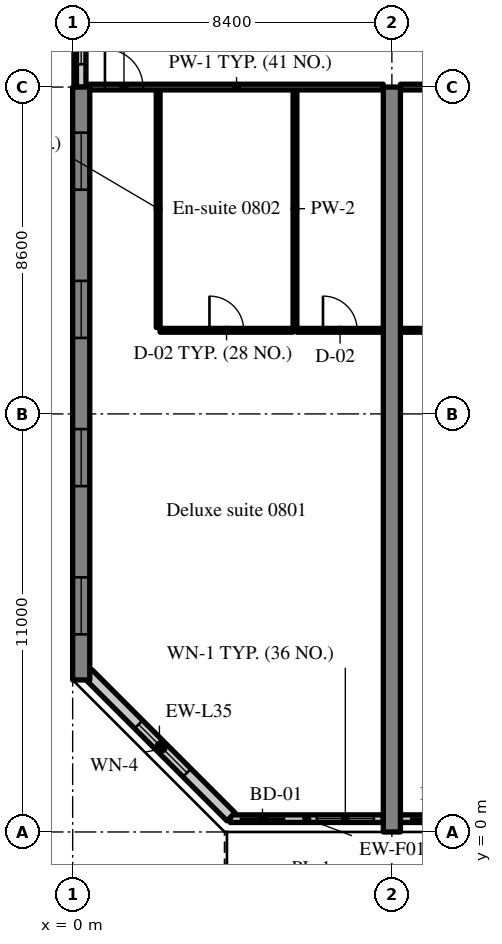
"""IFC4 building model, lengths in metres.
Left out: names, types, materials, properties, quantities, classifications, styles, units other than length and angle.
Written with IfcOpenShell. Run it as: python <this file> out.ifc"""

import sys

from ifc_helpers import new_model, si_unit, direction, frame, frame_2d, origin, place, context, subcontext, project, spatial, rectangle, extrude, source, transform, mapped, element, fill, save


model = new_model("IFC4")
c1 = context("Model", 3, precision=1e-05, world=origin(), true_north=direction((0.0, 1.0)))
c2 = subcontext(c1, "Body", "Model", "MODEL_VIEW")
j1 = project(units=[si_unit("LENGTHUNIT", "METRE"), si_unit("PLANEANGLEUNIT", "RADIAN")], contexts=[c1])
p1 = place(None, origin())
s1 = spatial("IfcSite", under=j1, at=p1, CompositionType="ELEMENT")
p2 = place(p1, origin())
s2 = spatial("IfcBuilding", under=s1, at=p2, CompositionType="ELEMENT")
p3 = place(p2, frame((0.0, 0.0, 39.2)))
s3 = spatial("IfcBuildingStorey", under=s2, at=p3, CompositionType="ELEMENT", Elevation=39.2)
m1 = source(origin(), c2, "Body", "SweptSolid", [
    extrude(rectangle(XDim=15.6, YDim=0.45, at=frame_2d((7.8, 0.0))), origin(), (0.0, 0.0, 1.0), 3.52),
])
p4 = place(p3, frame((0.225, 4.0, 0.0), z_axis=(0.0, 0.0, 1.0), x_axis=(0.0, 1.0, 0.0)))
e1 = element("IfcWall", 1, at=p4, inside=s3, PredefinedType="SHEAR", context=c2, shape_type="MappedRepresentation", body=[
    mapped(m1, transform((0.0, 0.0, 0.0), scale=1.0)),
])
m2 = source(origin(), c2, "Body", "SweptSolid", [
    extrude(rectangle(XDim=1.5, YDim=1.5, at=frame_2d((0.75, 0.75))), frame((0.0, 0.235, 0.0), z_axis=(0.0, -1.0, 0.0), x_axis=(1.0, 0.0, 0.0)), (0.0, 0.0, 1.0), 0.47),
])
p5 = place(p4, frame((1.2, 0.0, 0.9)))
e2 = element("IfcOpeningElement", 2, at=p5, cuts=e1, PredefinedType="OPENING", context=c2, shape_type="MappedRepresentation", body=[
    mapped(m2, transform((0.0, 0.0, 0.0), scale=1.0)),
])
p6 = place(p4, frame((5.1, 0.0, 0.9)))
e3 = element("IfcOpeningElement", 3, at=p6, cuts=e1, PredefinedType="OPENING", context=c2, shape_type="MappedRepresentation", body=[
    mapped(m2, transform((0.0, 0.0, 0.0), scale=1.0)),
])
p7 = place(p4, frame((9.0, 0.0, 0.9)))
e4 = element("IfcOpeningElement", 4, at=p7, cuts=e1, PredefinedType="OPENING", context=c2, shape_type="MappedRepresentation", body=[
    mapped(m2, transform((0.0, 0.0, 0.0), scale=1.0)),
])
p8 = place(p4, frame((12.9, 0.0, 0.9)))
e5 = element("IfcOpeningElement", 5, at=p8, cuts=e1, PredefinedType="OPENING", context=c2, shape_type="MappedRepresentation", body=[
    mapped(m2, transform((0.0, 0.0, 0.0), scale=1.0)),
])
m3 = source(origin(), c2, "Body", "SweptSolid", [
    extrude(rectangle(XDim=19.6, YDim=0.45, at=frame_2d((9.8, 0.0))), origin(), (0.0, 0.0, 1.0), 3.52),
])
p9 = place(p3, frame((8.4, 0.0, 0.0), z_axis=(0.0, 0.0, 1.0), x_axis=(0.0, 1.0, 0.0)))
e6 = element("IfcWall", 6, at=p9, inside=s3, PredefinedType="SHEAR", context=c2, shape_type="MappedRepresentation", body=[
    mapped(m3, transform((0.0, 0.0, 0.0), scale=1.0)),
])
m4 = source(origin(), c2, "Body", "SweptSolid", [
    extrude(rectangle(XDim=4.03, YDim=0.2, at=frame_2d((2.015, 0.0))), origin(), (0.0, 0.0, 1.0), 2.77),
])
p10 = place(p3, frame((4.145, 0.35, 0.0), z_axis=(0.0, 0.0, 1.0), x_axis=(1.0, 0.0, 0.0)))
e7 = element("IfcWall", 7, at=p10, inside=s3, PredefinedType="SOLIDWALL", context=c2, shape_type="MappedRepresentation", body=[
    mapped(m4, transform((0.0, 0.0, 0.0), scale=1.0)),
])
m5 = source(origin(), c2, "Body", "SweptSolid", [
    extrude(rectangle(XDim=1.2, YDim=2.4, at=frame_2d((0.6, 1.2))), frame((0.0, 0.11, 0.0), z_axis=(0.0, -1.0, 0.0), x_axis=(1.0, 0.0, 0.0)), (0.0, 0.0, 1.0), 0.22),
])
p11 = place(p10, frame((0.25, 0.0, 0.0)))
e8 = element("IfcOpeningElement", 8, at=p11, cuts=e7, PredefinedType="OPENING", context=c2, shape_type="MappedRepresentation", body=[
    mapped(m5, transform((0.0, 0.0, 0.0), scale=1.0)),
])
m6 = source(origin(), c2, "Body", "SweptSolid", [
    extrude(rectangle(XDim=1.5, YDim=1.5, at=frame_2d((0.75, 0.75))), frame((0.0, 0.11, 0.0), z_axis=(0.0, -1.0, 0.0), x_axis=(1.0, 0.0, 0.0)), (0.0, 0.0, 1.0), 0.22),
])
p12 = place(p10, frame((2.28, 0.0, 0.9)))
e9 = element("IfcOpeningElement", 9, at=p12, cuts=e7, PredefinedType="OPENING", context=c2, shape_type="MappedRepresentation", body=[
    mapped(m6, transform((0.0, 0.0, 0.0), scale=1.0)),
])
m7 = source(origin(), c2, "Body", "SweptSolid", [
    extrude(rectangle(XDim=3.525, YDim=0.2, at=frame_2d((1.762, 0.0))), origin(), (0.0, 0.0, 1.0), 2.77),
])
p13 = place(p3, frame((8.625, 0.35, 0.0), z_axis=(0.0, 0.0, 1.0), x_axis=(1.0, 0.0, 0.0)))
e10 = element("IfcWall", 10, at=p13, inside=s3, PredefinedType="SOLIDWALL", context=c2, shape_type="MappedRepresentation", body=[
    mapped(m7, transform((0.0, 0.0, 0.0), scale=1.0)),
])
p14 = place(p13, frame((0.25, 0.0, 0.0)))
e11 = element("IfcOpeningElement", 11, at=p14, cuts=e10, PredefinedType="OPENING", context=c2, shape_type="MappedRepresentation", body=[
    mapped(m5, transform((0.0, 0.0, 0.0), scale=1.0)),
])
p15 = place(p13, frame((1.775, 0.0, 0.9)))
e12 = element("IfcOpeningElement", 12, at=p15, cuts=e10, PredefinedType="OPENING", context=c2, shape_type="MappedRepresentation", body=[
    mapped(m6, transform((0.0, 0.0, 0.0), scale=1.0)),
])
m8 = source(origin(), c2, "Body", "SweptSolid", [
    extrude(rectangle(XDim=5.326, YDim=0.3, at=frame_2d((2.663, 0.0))), origin(), (0.0, 0.0, 1.0), 3.52),
])
p16 = place(p3, frame((0.4, 4.166, 0.0), z_axis=(0.0, 0.0, 1.0), x_axis=(0.707106781187, -0.707106781187, 0.0)))
e13 = element("IfcWall", 13, at=p16, inside=s3, PredefinedType="SOLIDWALL", context=c2, shape_type="MappedRepresentation", body=[
    mapped(m8, transform((0.0, 0.0, 0.0), scale=1.0)),
])
m9 = source(origin(), c2, "Body", "SweptSolid", [
    extrude(rectangle(XDim=1.8, YDim=1.5, at=frame_2d((0.9, 0.75))), frame((0.0, 0.16, 0.0), z_axis=(0.0, -1.0, 0.0), x_axis=(1.0, 0.0, 0.0)), (0.0, 0.0, 1.0), 0.32),
])
p17 = place(p16, frame((1.889, 0.0, 0.9)))
e14 = element("IfcOpeningElement", 14, at=p17, cuts=e13, PredefinedType="OPENING", context=c2, shape_type="MappedRepresentation", body=[
    mapped(m9, transform((0.0, 0.0, 0.0), scale=1.0)),
])
m10 = source(origin(), c2, "Body", "SweptSolid", [
    extrude(rectangle(XDim=2.4, YDim=0.25, at=frame_2d((1.2, 0.0))), origin(), (0.0, 0.0, 1.0), 2.62),
])
p18 = place(p3, frame((0.225, 19.6, 0.0), z_axis=(0.0, 0.0, 1.0), x_axis=(0.0, 1.0, 0.0)))
e15 = element("IfcWall", 15, at=p18, inside=s3, PredefinedType="SOLIDWALL", context=c2, shape_type="MappedRepresentation", body=[
    mapped(m10, transform((0.0, 0.0, 0.0), scale=1.0)),
])
m11 = source(origin(), c2, "Body", "SweptSolid", [
    extrude(rectangle(XDim=1.2, YDim=1.5, at=frame_2d((0.6, 0.75))), frame((0.0, 0.135, 0.0), z_axis=(0.0, -1.0, 0.0), x_axis=(1.0, 0.0, 0.0)), (0.0, 0.0, 1.0), 0.27),
])
p19 = place(p18, frame((0.6, 0.0, 0.9)))
e16 = element("IfcOpeningElement", 16, at=p19, cuts=e15, PredefinedType="OPENING", context=c2, shape_type="MappedRepresentation", body=[
    mapped(m11, transform((0.0, 0.0, 0.0), scale=1.0)),
])
m12 = source(origin(), c2, "Body", "SweptSolid", [
    extrude(rectangle(XDim=6.25, YDim=0.1, at=frame_2d((3.125, 0.0))), origin(), (0.0, 0.0, 1.0), 3.52),
])
for number, where, z_axis, x_axis in (
    (17, (2.25, 13.275, 0.0), (0.0, 0.0, 1.0), (0.0, 1.0, 0.0)),
    (18, (5.85, 13.275, 0.0), (0.0, 0.0, 1.0), (0.0, 1.0, 0.0)),
):
    element("IfcWall", number, at=place(p3, frame(where, z_axis=z_axis, x_axis=x_axis)), inside=s3, PredefinedType="PARTITIONING", context=c2, shape_type="MappedRepresentation", body=[
        mapped(m12, transform((0.0, 0.0, 0.0), scale=1.0)),
    ])
m13 = source(origin(), c2, "Body", "SweptSolid", [
    extrude(rectangle(XDim=3.5, YDim=0.1, at=frame_2d((1.75, 0.0))), origin(), (0.0, 0.0, 1.0), 3.52),
])
p20 = place(p3, frame((2.3, 13.2, 0.0), z_axis=(0.0, 0.0, 1.0), x_axis=(1.0, 0.0, 0.0)))
e19 = element("IfcWall", 19, at=p20, inside=s3, PredefinedType="PARTITIONING", context=c2, shape_type="MappedRepresentation", body=[
    mapped(m13, transform((0.0, 0.0, 0.0), scale=1.0)),
])
m14 = source(origin(), c2, "Body", "SweptSolid", [
    extrude(rectangle(XDim=0.9, YDim=2.1, at=frame_2d((0.45, 1.05))), frame((0.0, 0.06, 0.0), z_axis=(0.0, -1.0, 0.0), x_axis=(1.0, 0.0, 0.0)), (0.0, 0.0, 1.0), 0.12),
])
p21 = place(p20, frame((1.3, 0.0, 0.0)))
e20 = element("IfcOpeningElement", 20, at=p21, cuts=e19, PredefinedType="OPENING", context=c2, shape_type="MappedRepresentation", body=[
    mapped(m14, transform((0.0, 0.0, 0.0), scale=1.0)),
])
m15 = source(origin(), c2, "Body", "SweptSolid", [
    extrude(rectangle(XDim=2.275, YDim=0.1, at=frame_2d((1.138, 0.0))), origin(), (0.0, 0.0, 1.0), 3.52),
])
p22 = place(p3, frame((5.9, 13.2, 0.0), z_axis=(0.0, 0.0, 1.0), x_axis=(1.0, 0.0, 0.0)))
e21 = element("IfcWall", 21, at=p22, inside=s3, PredefinedType="PARTITIONING", context=c2, shape_type="MappedRepresentation", body=[
    mapped(m15, transform((0.0, 0.0, 0.0), scale=1.0)),
])
p23 = place(p22, frame((0.687, 0.0, 0.0)))
e22 = element("IfcOpeningElement", 22, at=p23, cuts=e21, PredefinedType="OPENING", context=c2, shape_type="MappedRepresentation", body=[
    mapped(m14, transform((0.0, 0.0, 0.0), scale=1.0)),
])
m16 = source(origin(), c2, "Body", "SweptSolid", [
    extrude(rectangle(XDim=7.725, YDim=0.15, at=frame_2d((3.863, 0.0))), origin(), (0.0, 0.0, 1.0), 2.82),
])
p24 = place(p3, frame((0.45, 19.6, 0.0), z_axis=(0.0, 0.0, 1.0), x_axis=(1.0, 0.0, 0.0)))
e23 = element("IfcWall", 23, at=p24, inside=s3, PredefinedType="PARTITIONING", context=c2, shape_type="MappedRepresentation", body=[
    mapped(m16, transform((0.0, 0.0, 0.0), scale=1.0)),
])
m17 = source(origin(), c2, "Body", "SweptSolid", [
    extrude(rectangle(XDim=1.0, YDim=2.1, at=frame_2d((0.5, 1.05))), frame((0.0, 0.085, 0.0), z_axis=(0.0, -1.0, 0.0), x_axis=(1.0, 0.0, 0.0)), (0.0, 0.0, 1.0), 0.17),
])
p25 = place(p24, frame((0.4, 0.0, 0.0)))
e24 = element("IfcOpeningElement", 24, at=p25, cuts=e23, PredefinedType="OPENING", context=c2, shape_type="MappedRepresentation", body=[
    mapped(m17, transform((0.0, 0.0, 0.0), scale=1.0)),
])
m18 = source(origin(), c2, "Body", "SweptSolid", [
    extrude(rectangle(XDim=2.05, YDim=0.1, at=frame_2d((1.025, 0.0))), origin(), (0.0, 0.0, 1.0), 3.52),
])
p26 = place(p3, frame((8.625, 13.2, 0.0), z_axis=(0.0, 0.0, 1.0), x_axis=(1.0, 0.0, 0.0)))
e25 = element("IfcWall", 25, at=p26, inside=s3, PredefinedType="PARTITIONING", context=c2, shape_type="MappedRepresentation", body=[
    mapped(m18, transform((0.0, 0.0, 0.0), scale=1.0)),
])
p27 = place(p26, frame((0.575, 0.0, 0.0)))
e26 = element("IfcOpeningElement", 26, at=p27, cuts=e25, PredefinedType="OPENING", context=c2, shape_type="MappedRepresentation", body=[
    mapped(m14, transform((0.0, 0.0, 0.0), scale=1.0)),
])
m19 = source(origin(), c2, "Body", "SweptSolid", [
    extrude(rectangle(XDim=3.9, YDim=0.15, at=frame_2d((1.95, 0.0))), origin(), (0.0, 0.0, 1.0), 2.82),
])
p28 = place(p3, frame((8.625, 19.6, 0.0), z_axis=(0.0, 0.0, 1.0), x_axis=(1.0, 0.0, 0.0)))
e27 = element("IfcWall", 27, at=p28, inside=s3, PredefinedType="PARTITIONING", context=c2, shape_type="MappedRepresentation", body=[
    mapped(m19, transform((0.0, 0.0, 0.0), scale=1.0)),
])
p29 = place(p28, frame((2.5, 0.0, 0.0)))
e28 = element("IfcOpeningElement", 28, at=p29, cuts=e27, PredefinedType="OPENING", context=c2, shape_type="MappedRepresentation", body=[
    mapped(m17, transform((0.0, 0.0, 0.0), scale=1.0)),
])
m20 = source(origin(), c2, "Body", "SweptSolid", [
    extrude(rectangle(XDim=1.2, YDim=2.4, at=frame_2d((0.6, 1.2))), frame((0.0, 0.025, 0.0), z_axis=(0.0, -1.0, 0.0), x_axis=(1.0, 0.0, 0.0)), (0.0, 0.0, 1.0), 0.05),
])
p30 = place(p11, origin())
e29 = element("IfcDoor", 29, at=p30, inside=s3, OperationType="SLIDING_TO_LEFT", PredefinedType="DOOR", context=c2, shape_type="MappedRepresentation", body=[
    mapped(m20, transform((0.0, 0.0, 0.0), scale=1.0)),
])
fill(e8, e29)
m21 = source(origin(), c2, "Body", "SweptSolid", [
    extrude(rectangle(XDim=1.5, YDim=1.5, at=frame_2d((0.75, 0.75))), frame((0.0, 0.03, 0.0), z_axis=(0.0, -1.0, 0.0), x_axis=(1.0, 0.0, 0.0)), (0.0, 0.0, 1.0), 0.06),
])
p31 = place(p12, origin())
e30 = element("IfcWindow", 30, at=p31, inside=s3, PartitioningType="SINGLE_PANEL", PredefinedType="WINDOW", context=c2, shape_type="MappedRepresentation", body=[
    mapped(m21, transform((0.0, 0.0, 0.0), scale=1.0)),
])
fill(e9, e30)
p32 = place(p14, origin())
e31 = element("IfcDoor", 31, at=p32, inside=s3, OperationType="SLIDING_TO_RIGHT", PredefinedType="DOOR", context=c2, shape_type="MappedRepresentation", body=[
    mapped(m20, transform((0.0, 0.0, 0.0), scale=1.0)),
])
fill(e11, e31)
m22 = source(origin(), c2, "Body", "SweptSolid", [
    extrude(rectangle(XDim=1.8, YDim=1.5, at=frame_2d((0.9, 0.75))), frame((0.0, 0.03, 0.0), z_axis=(0.0, -1.0, 0.0), x_axis=(1.0, 0.0, 0.0)), (0.0, 0.0, 1.0), 0.06),
])
p33 = place(p17, origin())
e32 = element("IfcWindow", 32, at=p33, inside=s3, PartitioningType="SINGLE_PANEL", PredefinedType="WINDOW", context=c2, shape_type="MappedRepresentation", body=[
    mapped(m22, transform((0.0, 0.0, 0.0), scale=1.0)),
])
fill(e14, e32)
p34 = place(p5, origin())
e33 = element("IfcWindow", 33, at=p34, inside=s3, PartitioningType="SINGLE_PANEL", PredefinedType="WINDOW", context=c2, shape_type="MappedRepresentation", body=[
    mapped(m21, transform((0.0, 0.0, 0.0), scale=1.0)),
])
fill(e2, e33)
p35 = place(p6, origin())
e34 = element("IfcWindow", 34, at=p35, inside=s3, PartitioningType="SINGLE_PANEL", PredefinedType="WINDOW", context=c2, shape_type="MappedRepresentation", body=[
    mapped(m21, transform((0.0, 0.0, 0.0), scale=1.0)),
])
fill(e3, e34)
p36 = place(p7, origin())
e35 = element("IfcWindow", 35, at=p36, inside=s3, PartitioningType="SINGLE_PANEL", PredefinedType="WINDOW", context=c2, shape_type="MappedRepresentation", body=[
    mapped(m21, transform((0.0, 0.0, 0.0), scale=1.0)),
])
fill(e4, e35)
p37 = place(p8, origin())
e36 = element("IfcWindow", 36, at=p37, inside=s3, PartitioningType="SINGLE_PANEL", PredefinedType="WINDOW", context=c2, shape_type="MappedRepresentation", body=[
    mapped(m21, transform((0.0, 0.0, 0.0), scale=1.0)),
])
fill(e5, e36)
m23 = source(origin(), c2, "Body", "SweptSolid", [
    extrude(rectangle(XDim=1.2, YDim=1.5, at=frame_2d((0.6, 0.75))), frame((0.0, 0.03, 0.0), z_axis=(0.0, -1.0, 0.0), x_axis=(1.0, 0.0, 0.0)), (0.0, 0.0, 1.0), 0.06),
])
p38 = place(p19, origin())
e37 = element("IfcWindow", 37, at=p38, inside=s3, PartitioningType="SINGLE_PANEL", PredefinedType="WINDOW", context=c2, shape_type="MappedRepresentation", body=[
    mapped(m23, transform((0.0, 0.0, 0.0), scale=1.0)),
])
fill(e16, e37)
m24 = source(origin(), c2, "Body", "SweptSolid", [
    extrude(rectangle(XDim=0.9, YDim=2.1, at=frame_2d((0.45, 1.05))), frame((0.0, 0.025, 0.0), z_axis=(0.0, -1.0, 0.0), x_axis=(1.0, 0.0, 0.0)), (0.0, 0.0, 1.0), 0.05),
])
p39 = place(p21, origin())
e38 = element("IfcDoor", 38, at=p39, inside=s3, OperationType="SINGLE_SWING_LEFT", PredefinedType="DOOR", context=c2, shape_type="MappedRepresentation", body=[
    mapped(m24, transform((0.0, 0.0, 0.0), scale=1.0)),
])
fill(e20, e38)
p40 = place(p23, origin())
e39 = element("IfcDoor", 39, at=p40, inside=s3, OperationType="SINGLE_SWING_LEFT", PredefinedType="DOOR", context=c2, shape_type="MappedRepresentation", body=[
    mapped(m24, transform((0.0, 0.0, 0.0), scale=1.0)),
])
fill(e22, e39)
m25 = source(origin(), c2, "Body", "SweptSolid", [
    extrude(rectangle(XDim=1.0, YDim=2.1, at=frame_2d((0.5, 1.05))), frame((0.0, 0.025, 0.0), z_axis=(0.0, -1.0, 0.0), x_axis=(1.0, 0.0, 0.0)), (0.0, 0.0, 1.0), 0.05),
])
p41 = place(p25, origin())
e40 = element("IfcDoor", 40, at=p41, inside=s3, OperationType="SINGLE_SWING_LEFT", PredefinedType="DOOR", context=c2, shape_type="MappedRepresentation", body=[
    mapped(m25, transform((0.0, 0.0, 0.0), scale=1.0)),
])
fill(e24, e40)
save(model, sys.argv[1])
